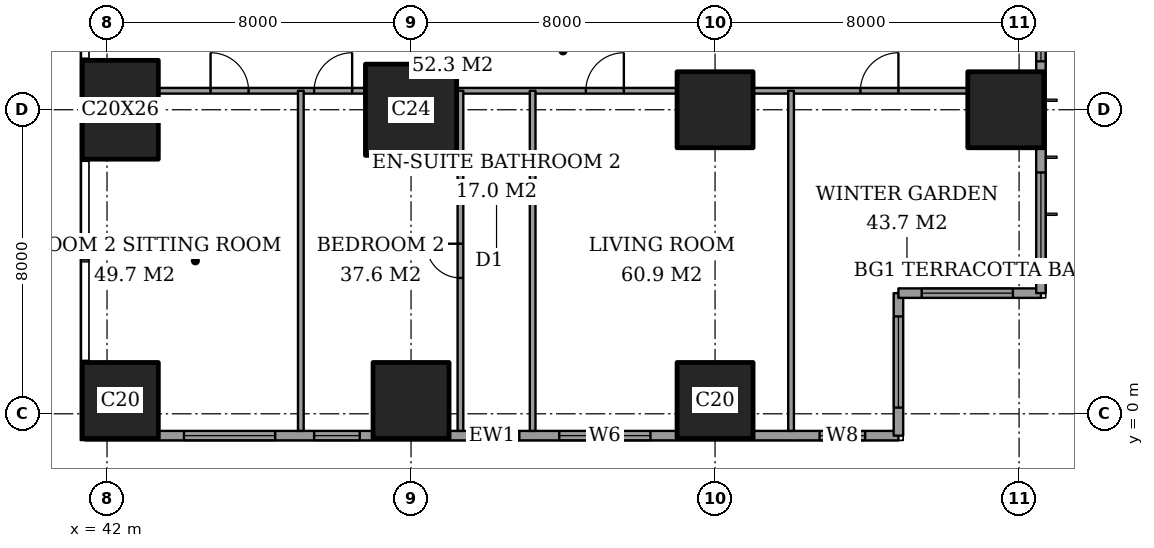
"""IFC4 building model, lengths in metres.
Left out: names, types, materials, properties, quantities, classifications, styles, units other than length and angle.
Written with IfcOpenShell. Run it as: python <this file> out.ifc"""

import sys

from ifc_helpers import new_model, si_unit, direction, frame, frame_2d, origin, origin_2d, place, context, subcontext, project, spatial, rectangle, extrude, element, fill, save


model = new_model("IFC4")
c1 = context("Model", 3, precision=1e-05, world=origin(), true_north=direction((0.0, 1.0)))
c2 = subcontext(c1, "Body", "Model", "MODEL_VIEW")
j1 = project(units=[si_unit("LENGTHUNIT", "METRE"), si_unit("PLANEANGLEUNIT", "RADIAN")], contexts=[c1])
p1 = place(None, origin())
s1 = spatial("IfcSite", under=j1, at=p1, CompositionType="ELEMENT")
p2 = place(p1, origin())
s2 = spatial("IfcBuilding", under=s1, at=p2, CompositionType="ELEMENT")
p3 = place(p2, frame((0.0, 0.0, 62.0)))
s3 = spatial("IfcBuildingStorey", under=s2, at=p3, CompositionType="ELEMENT", Elevation=62.0)
p4 = place(p3, frame((42.35, 0.35, 0.0), z_axis=(0.0, 0.0, 1.0), x_axis=(1.0, 0.0, 0.0)))
e1 = element("IfcColumn", 1, at=p4, inside=s3, PredefinedType="COLUMN", context=c2, shape_type="SweptSolid", body=[
    extrude(rectangle(XDim=2.0, YDim=2.0, at=origin_2d()), origin(), (0.0, 0.0, 1.0), 3.6),
])
p5 = place(p3, frame((42.35, 8.0, 0.0), z_axis=(0.0, 0.0, 1.0), x_axis=(1.0, 0.0, 0.0)))
e2 = element("IfcColumn", 2, at=p5, inside=s3, PredefinedType="COLUMN", context=c2, shape_type="SweptSolid", body=[
    extrude(rectangle(XDim=2.0, YDim=2.6, at=origin_2d()), origin(), (0.0, 0.0, 1.0), 3.6),
])
p6 = place(p3, frame((50.0, 0.35, 0.0), z_axis=(0.0, 0.0, 1.0), x_axis=(1.0, 0.0, 0.0)))
e3 = element("IfcColumn", 3, at=p6, inside=s3, PredefinedType="COLUMN", context=c2, shape_type="SweptSolid", body=[
    extrude(rectangle(XDim=2.0, YDim=2.0, at=origin_2d()), origin(), (0.0, 0.0, 1.0), 3.6),
])
p7 = place(p3, frame((50.0, 8.0, 0.0), z_axis=(0.0, 0.0, 1.0), x_axis=(1.0, 0.0, 0.0)))
e4 = element("IfcColumn", 4, at=p7, inside=s3, PredefinedType="COLUMN", context=c2, shape_type="SweptSolid", body=[
    extrude(rectangle(XDim=2.4, YDim=2.4, at=origin_2d()), origin(), (0.0, 0.0, 1.0), 3.6),
])
for number, where, z_axis, x_axis in (
    (5, (58.0, 0.35, 0.0), (0.0, 0.0, 1.0), (1.0, 0.0, 0.0)),
    (6, (58.0, 8.0, 0.0), (0.0, 0.0, 1.0), (1.0, 0.0, 0.0)),
    (7, (65.65, 8.0, 0.0), (0.0, 0.0, 1.0), (1.0, 0.0, 0.0)),
):
    element("IfcColumn", number, at=place(p3, frame(where, z_axis=z_axis, x_axis=x_axis)), inside=s3, PredefinedType="COLUMN", context=c2, shape_type="SweptSolid", body=[
        extrude(rectangle(XDim=2.0, YDim=2.0, at=origin_2d()), origin(), (0.0, 0.0, 1.0), 3.6),
    ])
p8 = place(p3, frame((41.425, -0.575, 0.0), z_axis=(0.0, 0.0, 1.0), x_axis=(1.0, 0.0, 0.0)))
e8 = element("IfcWall", 8, at=p8, inside=s3, PredefinedType="SOLIDWALL", context=c2, shape_type="SweptSolid", body=[
    extrude(rectangle(XDim=21.4, YDim=0.25, at=frame_2d((10.7, 0.0))), origin(), (0.0, 0.0, 1.0), 3.6),
])
p9 = place(p8, frame((2.6, 0.0, 0.6)))
e9 = element("IfcOpeningElement", 9, at=p9, cuts=e8, PredefinedType="OPENING", context=c2, shape_type="SweptSolid", body=[
    extrude(rectangle(XDim=2.4, YDim=2.0, at=frame_2d((1.2, 1.0))), frame((0.0, 0.135, 0.0), z_axis=(0.0, -1.0, 0.0), x_axis=(1.0, 0.0, 0.0)), (0.0, 0.0, 1.0), 0.27),
])
p10 = place(p8, frame((6.025, 0.0, 0.6)))
e10 = element("IfcOpeningElement", 10, at=p10, cuts=e8, PredefinedType="OPENING", context=c2, shape_type="SweptSolid", body=[
    extrude(rectangle(XDim=1.2, YDim=2.0, at=frame_2d((0.6, 1.0))), frame((0.0, 0.135, 0.0), z_axis=(0.0, -1.0, 0.0), x_axis=(1.0, 0.0, 0.0)), (0.0, 0.0, 1.0), 0.27),
])
p11 = place(p8, frame((10.225, 0.0, 0.6)))
e11 = element("IfcOpeningElement", 11, at=p11, cuts=e8, PredefinedType="OPENING", context=c2, shape_type="SweptSolid", body=[
    extrude(rectangle(XDim=1.2, YDim=2.0, at=frame_2d((0.6, 1.0))), frame((0.0, 0.135, 0.0), z_axis=(0.0, -1.0, 0.0), x_axis=(1.0, 0.0, 0.0)), (0.0, 0.0, 1.0), 0.27),
])
p12 = place(p8, frame((12.475, 0.0, 0.6)))
e12 = element("IfcOpeningElement", 12, at=p12, cuts=e8, PredefinedType="OPENING", context=c2, shape_type="SweptSolid", body=[
    extrude(rectangle(XDim=2.4, YDim=2.0, at=frame_2d((1.2, 1.0))), frame((0.0, 0.135, 0.0), z_axis=(0.0, -1.0, 0.0), x_axis=(1.0, 0.0, 0.0)), (0.0, 0.0, 1.0), 0.27),
])
p13 = place(p8, frame((19.325, 0.0, 0.6)))
e13 = element("IfcOpeningElement", 13, at=p13, cuts=e8, PredefinedType="OPENING", context=c2, shape_type="SweptSolid", body=[
    extrude(rectangle(XDim=1.2, YDim=2.0, at=frame_2d((0.6, 1.0))), frame((0.0, 0.135, 0.0), z_axis=(0.0, -1.0, 0.0), x_axis=(1.0, 0.0, 0.0)), (0.0, 0.0, 1.0), 0.27),
])
p14 = place(p3, frame((62.825, -0.575, 0.0), z_axis=(0.0, 0.0, 1.0), x_axis=(0.0, 1.0, 0.0)))
e14 = element("IfcWall", 14, at=p14, inside=s3, PredefinedType="SOLIDWALL", context=c2, shape_type="SweptSolid", body=[
    extrude(rectangle(XDim=3.75, YDim=0.25, at=frame_2d((1.875, 0.0))), origin(), (0.0, 0.0, 1.0), 3.6),
])
p15 = place(p14, frame((0.738, 0.0, 0.6)))
e15 = element("IfcOpeningElement", 15, at=p15, cuts=e14, PredefinedType="OPENING", context=c2, shape_type="SweptSolid", body=[
    extrude(rectangle(XDim=2.4, YDim=2.0, at=frame_2d((1.2, 1.0))), frame((0.0, 0.135, 0.0), z_axis=(0.0, -1.0, 0.0), x_axis=(1.0, 0.0, 0.0)), (0.0, 0.0, 1.0), 0.27),
])
p16 = place(p3, frame((62.825, 3.175, 0.0), z_axis=(0.0, 0.0, 1.0), x_axis=(1.0, 0.0, 0.0)))
e16 = element("IfcWall", 16, at=p16, inside=s3, PredefinedType="SOLIDWALL", context=c2, shape_type="SweptSolid", body=[
    extrude(rectangle(XDim=3.75, YDim=0.25, at=frame_2d((1.875, 0.0))), origin(), (0.0, 0.0, 1.0), 3.6),
])
p17 = place(p16, frame((0.613, 0.0, 0.6)))
e17 = element("IfcOpeningElement", 17, at=p17, cuts=e16, PredefinedType="OPENING", context=c2, shape_type="SweptSolid", body=[
    extrude(rectangle(XDim=2.4, YDim=2.0, at=frame_2d((1.2, 1.0))), frame((0.0, 0.135, 0.0), z_axis=(0.0, -1.0, 0.0), x_axis=(1.0, 0.0, 0.0)), (0.0, 0.0, 1.0), 0.27),
])
p18 = place(p3, frame((66.575, 3.175, 0.0), z_axis=(0.0, 0.0, 1.0), x_axis=(0.0, 1.0, 0.0)))
e18 = element("IfcWall", 18, at=p18, inside=s3, PredefinedType="SOLIDWALL", context=c2, shape_type="SweptSolid", body=[
    extrude(rectangle(XDim=41.65, YDim=0.25, at=frame_2d((20.825, 0.0))), origin(), (0.0, 0.0, 1.0), 3.6),
])
p19 = place(p18, frame((0.775, 0.0, 0.6)))
e19 = element("IfcOpeningElement", 19, at=p19, cuts=e18, PredefinedType="OPENING", context=c2, shape_type="SweptSolid", body=[
    extrude(rectangle(XDim=2.4, YDim=2.0, at=frame_2d((1.2, 1.0))), frame((0.0, 0.135, 0.0), z_axis=(0.0, -1.0, 0.0), x_axis=(1.0, 0.0, 0.0)), (0.0, 0.0, 1.0), 0.27),
])
p20 = place(p18, frame((6.1, 0.0, 0.6)))
e20 = element("IfcOpeningElement", 20, at=p20, cuts=e18, PredefinedType="OPENING", context=c2, shape_type="SweptSolid", body=[
    extrude(rectangle(XDim=1.2, YDim=2.0, at=frame_2d((0.6, 1.0))), frame((0.0, 0.135, 0.0), z_axis=(0.0, -1.0, 0.0), x_axis=(1.0, 0.0, 0.0)), (0.0, 0.0, 1.0), 0.27),
])
p21 = place(p18, frame((8.275, 0.0, 0.6)))
e21 = element("IfcOpeningElement", 21, at=p21, cuts=e18, PredefinedType="OPENING", context=c2, shape_type="SweptSolid", body=[
    extrude(rectangle(XDim=2.4, YDim=2.0, at=frame_2d((1.2, 1.0))), frame((0.0, 0.135, 0.0), z_axis=(0.0, -1.0, 0.0), x_axis=(1.0, 0.0, 0.0)), (0.0, 0.0, 1.0), 0.27),
])
p22 = place(p18, frame((15.775, 0.0, 0.6)))
e22 = element("IfcOpeningElement", 22, at=p22, cuts=e18, PredefinedType="OPENING", context=c2, shape_type="SweptSolid", body=[
    extrude(rectangle(XDim=2.4, YDim=2.0, at=frame_2d((1.2, 1.0))), frame((0.0, 0.135, 0.0), z_axis=(0.0, -1.0, 0.0), x_axis=(1.0, 0.0, 0.0)), (0.0, 0.0, 1.0), 0.27),
])
p23 = place(p18, frame((23.475, 0.0, 0.6)))
e23 = element("IfcOpeningElement", 23, at=p23, cuts=e18, PredefinedType="OPENING", context=c2, shape_type="SweptSolid", body=[
    extrude(rectangle(XDim=2.4, YDim=2.0, at=frame_2d((1.2, 1.0))), frame((0.0, 0.135, 0.0), z_axis=(0.0, -1.0, 0.0), x_axis=(1.0, 0.0, 0.0)), (0.0, 0.0, 1.0), 0.27),
])
p24 = place(p18, frame((30.875, 0.0, 0.6)))
e24 = element("IfcOpeningElement", 24, at=p24, cuts=e18, PredefinedType="OPENING", context=c2, shape_type="SweptSolid", body=[
    extrude(rectangle(XDim=2.4, YDim=2.0, at=frame_2d((1.2, 1.0))), frame((0.0, 0.135, 0.0), z_axis=(0.0, -1.0, 0.0), x_axis=(1.0, 0.0, 0.0)), (0.0, 0.0, 1.0), 0.27),
])
p25 = place(p18, frame((34.325, 0.0, 0.6)))
e25 = element("IfcOpeningElement", 25, at=p25, cuts=e18, PredefinedType="OPENING", context=c2, shape_type="SweptSolid", body=[
    extrude(rectangle(XDim=1.2, YDim=2.0, at=frame_2d((0.6, 1.0))), frame((0.0, 0.135, 0.0), z_axis=(0.0, -1.0, 0.0), x_axis=(1.0, 0.0, 0.0)), (0.0, 0.0, 1.0), 0.27),
])
p26 = place(p18, frame((38.475, 0.0, 0.6)))
e26 = element("IfcOpeningElement", 26, at=p26, cuts=e18, PredefinedType="OPENING", context=c2, shape_type="SweptSolid", body=[
    extrude(rectangle(XDim=2.4, YDim=2.0, at=frame_2d((1.2, 1.0))), frame((0.0, 0.135, 0.0), z_axis=(0.0, -1.0, 0.0), x_axis=(1.0, 0.0, 0.0)), (0.0, 0.0, 1.0), 0.27),
])
p27 = place(p3, frame((43.35, 8.5, 0.0), z_axis=(0.0, 0.0, 1.0), x_axis=(1.0, 0.0, 0.0)))
e27 = element("IfcWall", 27, at=p27, inside=s3, PredefinedType="PARTITIONING", context=c2, shape_type="SweptSolid", body=[
    extrude(rectangle(XDim=5.45, YDim=0.15, at=frame_2d((2.725, 0.0))), origin(), (0.0, 0.0, 1.0), 3.35),
])
p28 = place(p27, frame((4.1, 0.0, 0.0)))
e28 = element("IfcOpeningElement", 28, at=p28, cuts=e27, PredefinedType="OPENING", context=c2, shape_type="SweptSolid", body=[
    extrude(rectangle(XDim=1.0, YDim=2.1, at=frame_2d((0.5, 1.05))), frame((0.0, 0.085, 0.0), z_axis=(0.0, -1.0, 0.0), x_axis=(1.0, 0.0, 0.0)), (0.0, 0.0, 1.0), 0.17),
])
p29 = place(p27, frame((1.375, 0.0, 0.0)))
e29 = element("IfcOpeningElement", 29, at=p29, cuts=e27, PredefinedType="OPENING", context=c2, shape_type="SweptSolid", body=[
    extrude(rectangle(XDim=1.0, YDim=2.1, at=frame_2d((0.5, 1.05))), frame((0.0, 0.085, 0.0), z_axis=(0.0, -1.0, 0.0), x_axis=(1.0, 0.0, 0.0)), (0.0, 0.0, 1.0), 0.17),
])
p30 = place(p3, frame((51.2, 8.5, 0.0), z_axis=(0.0, 0.0, 1.0), x_axis=(1.0, 0.0, 0.0)))
e30 = element("IfcWall", 30, at=p30, inside=s3, PredefinedType="PARTITIONING", context=c2, shape_type="SweptSolid", body=[
    extrude(rectangle(XDim=5.8, YDim=0.15, at=frame_2d((2.9, 0.0))), origin(), (0.0, 0.0, 1.0), 3.35),
])
p31 = place(p30, frame((3.4, 0.0, 0.0)))
e31 = element("IfcOpeningElement", 31, at=p31, cuts=e30, PredefinedType="OPENING", context=c2, shape_type="SweptSolid", body=[
    extrude(rectangle(XDim=1.0, YDim=2.1, at=frame_2d((0.5, 1.05))), frame((0.0, 0.085, 0.0), z_axis=(0.0, -1.0, 0.0), x_axis=(1.0, 0.0, 0.0)), (0.0, 0.0, 1.0), 0.17),
])
p32 = place(p3, frame((59.0, 8.5, 0.0), z_axis=(0.0, 0.0, 1.0), x_axis=(1.0, 0.0, 0.0)))
e32 = element("IfcWall", 32, at=p32, inside=s3, PredefinedType="PARTITIONING", context=c2, shape_type="SweptSolid", body=[
    extrude(rectangle(XDim=5.65, YDim=0.15, at=frame_2d((2.825, 0.0))), origin(), (0.0, 0.0, 1.0), 3.35),
])
p33 = place(p32, frame((2.825, 0.0, 0.0)))
e33 = element("IfcOpeningElement", 33, at=p33, cuts=e32, PredefinedType="OPENING", context=c2, shape_type="SweptSolid", body=[
    extrude(rectangle(XDim=1.0, YDim=2.1, at=frame_2d((0.5, 1.05))), frame((0.0, 0.085, 0.0), z_axis=(0.0, -1.0, 0.0), x_axis=(1.0, 0.0, 0.0)), (0.0, 0.0, 1.0), 0.17),
])
p34 = place(p3, frame((47.1, -0.45, 0.0), z_axis=(0.0, 0.0, 1.0), x_axis=(0.0, 1.0, 0.0)))
e34 = element("IfcWall", 34, at=p34, inside=s3, PredefinedType="PARTITIONING", context=c2, shape_type="SweptSolid", body=[
    extrude(rectangle(XDim=8.95, YDim=0.15, at=frame_2d((4.475, 0.0))), origin(), (0.0, 0.0, 1.0), 3.35),
])
p35 = place(p3, frame((51.3, -0.45, 0.0), z_axis=(0.0, 0.0, 1.0), x_axis=(0.0, 1.0, 0.0)))
e35 = element("IfcWall", 35, at=p35, inside=s3, PredefinedType="PARTITIONING", context=c2, shape_type="SweptSolid", body=[
    extrude(rectangle(XDim=8.95, YDim=0.15, at=frame_2d((4.475, 0.0))), origin(), (0.0, 0.0, 1.0), 3.35),
])
p36 = place(p35, frame((4.025, 0.0, 0.0)))
e36 = element("IfcOpeningElement", 36, at=p36, cuts=e35, PredefinedType="OPENING", context=c2, shape_type="SweptSolid", body=[
    extrude(rectangle(XDim=0.9, YDim=2.1, at=frame_2d((0.45, 1.05))), frame((0.0, 0.085, 0.0), z_axis=(0.0, -1.0, 0.0), x_axis=(1.0, 0.0, 0.0)), (0.0, 0.0, 1.0), 0.17),
])
for number, where, z_axis, x_axis in (
    (37, (53.2, -0.45, 0.0), (0.0, 0.0, 1.0), (0.0, 1.0, 0.0)),
    (38, (60.0, -0.45, 0.0), (0.0, 0.0, 1.0), (0.0, 1.0, 0.0)),
):
    element("IfcWall", number, at=place(p3, frame(where, z_axis=z_axis, x_axis=x_axis)), inside=s3, PredefinedType="PARTITIONING", context=c2, shape_type="SweptSolid", body=[
        extrude(rectangle(XDim=8.95, YDim=0.15, at=frame_2d((4.475, 0.0))), origin(), (0.0, 0.0, 1.0), 3.35),
    ])
p37 = place(p9, origin())
e39 = element("IfcWindow", 39, at=p37, inside=s3, PartitioningType="SINGLE_PANEL", PredefinedType="WINDOW", context=c2, shape_type="SweptSolid", body=[
    extrude(rectangle(XDim=2.4, YDim=2.0, at=frame_2d((1.2, 1.0))), frame((0.0, 0.03, 0.0), z_axis=(0.0, -1.0, 0.0), x_axis=(1.0, 0.0, 0.0)), (0.0, 0.0, 1.0), 0.06),
])
fill(e9, e39)
p38 = place(p10, origin())
e40 = element("IfcWindow", 40, at=p38, inside=s3, PartitioningType="SINGLE_PANEL", PredefinedType="WINDOW", context=c2, shape_type="SweptSolid", body=[
    extrude(rectangle(XDim=1.2, YDim=2.0, at=frame_2d((0.6, 1.0))), frame((0.0, 0.03, 0.0), z_axis=(0.0, -1.0, 0.0), x_axis=(1.0, 0.0, 0.0)), (0.0, 0.0, 1.0), 0.06),
])
fill(e10, e40)
p39 = place(p11, origin())
e41 = element("IfcWindow", 41, at=p39, inside=s3, PartitioningType="SINGLE_PANEL", PredefinedType="WINDOW", context=c2, shape_type="SweptSolid", body=[
    extrude(rectangle(XDim=1.2, YDim=2.0, at=frame_2d((0.6, 1.0))), frame((0.0, 0.03, 0.0), z_axis=(0.0, -1.0, 0.0), x_axis=(1.0, 0.0, 0.0)), (0.0, 0.0, 1.0), 0.06),
])
fill(e11, e41)
p40 = place(p12, origin())
e42 = element("IfcWindow", 42, at=p40, inside=s3, PartitioningType="SINGLE_PANEL", PredefinedType="WINDOW", context=c2, shape_type="SweptSolid", body=[
    extrude(rectangle(XDim=2.4, YDim=2.0, at=frame_2d((1.2, 1.0))), frame((0.0, 0.03, 0.0), z_axis=(0.0, -1.0, 0.0), x_axis=(1.0, 0.0, 0.0)), (0.0, 0.0, 1.0), 0.06),
])
fill(e12, e42)
p41 = place(p13, origin())
e43 = element("IfcWindow", 43, at=p41, inside=s3, PartitioningType="SINGLE_PANEL", PredefinedType="WINDOW", context=c2, shape_type="SweptSolid", body=[
    extrude(rectangle(XDim=1.2, YDim=2.0, at=frame_2d((0.6, 1.0))), frame((0.0, 0.03, 0.0), z_axis=(0.0, -1.0, 0.0), x_axis=(1.0, 0.0, 0.0)), (0.0, 0.0, 1.0), 0.06),
])
fill(e13, e43)
p42 = place(p15, origin())
e44 = element("IfcWindow", 44, at=p42, inside=s3, PartitioningType="SINGLE_PANEL", PredefinedType="WINDOW", context=c2, shape_type="SweptSolid", body=[
    extrude(rectangle(XDim=2.4, YDim=2.0, at=frame_2d((1.2, 1.0))), frame((0.0, 0.03, 0.0), z_axis=(0.0, -1.0, 0.0), x_axis=(1.0, 0.0, 0.0)), (0.0, 0.0, 1.0), 0.06),
])
fill(e15, e44)
p43 = place(p17, origin())
e45 = element("IfcWindow", 45, at=p43, inside=s3, PartitioningType="SINGLE_PANEL", PredefinedType="WINDOW", context=c2, shape_type="SweptSolid", body=[
    extrude(rectangle(XDim=2.4, YDim=2.0, at=frame_2d((1.2, 1.0))), frame((0.0, 0.03, 0.0), z_axis=(0.0, -1.0, 0.0), x_axis=(1.0, 0.0, 0.0)), (0.0, 0.0, 1.0), 0.06),
])
fill(e17, e45)
p44 = place(p19, origin())
e46 = element("IfcWindow", 46, at=p44, inside=s3, PartitioningType="SINGLE_PANEL", PredefinedType="WINDOW", context=c2, shape_type="SweptSolid", body=[
    extrude(rectangle(XDim=2.4, YDim=2.0, at=frame_2d((1.2, 1.0))), frame((0.0, 0.03, 0.0), z_axis=(0.0, -1.0, 0.0), x_axis=(1.0, 0.0, 0.0)), (0.0, 0.0, 1.0), 0.06),
])
fill(e19, e46)
p45 = place(p20, origin())
e47 = element("IfcWindow", 47, at=p45, inside=s3, PartitioningType="SINGLE_PANEL", PredefinedType="WINDOW", context=c2, shape_type="SweptSolid", body=[
    extrude(rectangle(XDim=1.2, YDim=2.0, at=frame_2d((0.6, 1.0))), frame((0.0, 0.03, 0.0), z_axis=(0.0, -1.0, 0.0), x_axis=(1.0, 0.0, 0.0)), (0.0, 0.0, 1.0), 0.06),
])
fill(e20, e47)
p46 = place(p33, origin())
e48 = element("IfcDoor", 48, at=p46, inside=s3, OperationType="SINGLE_SWING_LEFT", PredefinedType="DOOR", context=c2, shape_type="SweptSolid", body=[
    extrude(rectangle(XDim=1.0, YDim=2.1, at=frame_2d((0.5, 1.05))), frame((0.0, 0.025, 0.0), z_axis=(0.0, -1.0, 0.0), x_axis=(1.0, 0.0, 0.0)), (0.0, 0.0, 1.0), 0.05),
])
fill(e33, e48)
p47 = place(p31, origin())
e49 = element("IfcDoor", 49, at=p47, inside=s3, OperationType="SINGLE_SWING_LEFT", PredefinedType="DOOR", context=c2, shape_type="SweptSolid", body=[
    extrude(rectangle(XDim=1.0, YDim=2.1, at=frame_2d((0.5, 1.05))), frame((0.0, 0.025, 0.0), z_axis=(0.0, -1.0, 0.0), x_axis=(1.0, 0.0, 0.0)), (0.0, 0.0, 1.0), 0.05),
])
fill(e31, e49)
p48 = place(p36, origin())
e50 = element("IfcDoor", 50, at=p48, inside=s3, OperationType="SINGLE_SWING_LEFT", PredefinedType="DOOR", context=c2, shape_type="SweptSolid", body=[
    extrude(rectangle(XDim=0.9, YDim=2.1, at=frame_2d((0.45, 1.05))), frame((0.0, 0.025, 0.0), z_axis=(0.0, -1.0, 0.0), x_axis=(1.0, 0.0, 0.0)), (0.0, 0.0, 1.0), 0.05),
])
fill(e36, e50)
p49 = place(p28, origin())
e51 = element("IfcDoor", 51, at=p49, inside=s3, OperationType="SINGLE_SWING_LEFT", PredefinedType="DOOR", context=c2, shape_type="SweptSolid", body=[
    extrude(rectangle(XDim=1.0, YDim=2.1, at=frame_2d((0.5, 1.05))), frame((0.0, 0.025, 0.0), z_axis=(0.0, -1.0, 0.0), x_axis=(1.0, 0.0, 0.0)), (0.0, 0.0, 1.0), 0.05),
])
fill(e28, e51)
p50 = place(p29, origin())
e52 = element("IfcDoor", 52, at=p50, inside=s3, OperationType="SINGLE_SWING_RIGHT", PredefinedType="DOOR", context=c2, shape_type="SweptSolid", body=[
    extrude(rectangle(XDim=1.0, YDim=2.1, at=frame_2d((0.5, 1.05))), frame((0.0, 0.025, 0.0), z_axis=(0.0, -1.0, 0.0), x_axis=(1.0, 0.0, 0.0)), (0.0, 0.0, 1.0), 0.05),
])
fill(e29, e52)
save(model, sys.argv[1])
